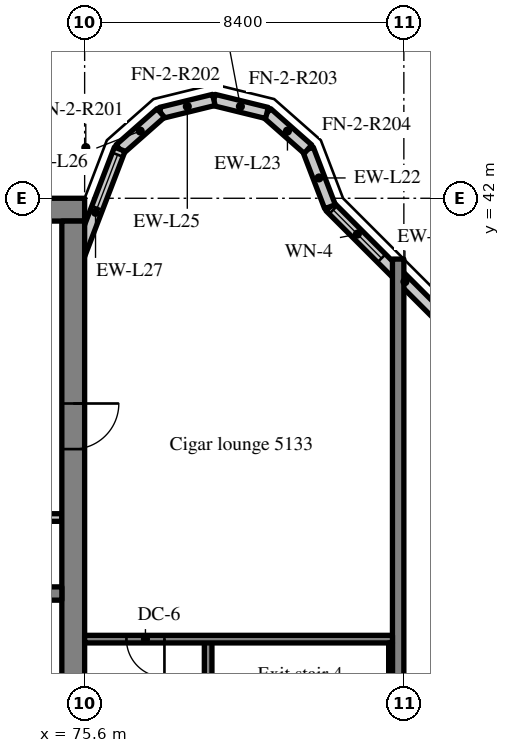
"""IFC4 building model, lengths in metres.
Left out: names, types, materials, properties, quantities, classifications, styles, units other than length and angle.
Written with IfcOpenShell. Run it as: python <this file> out.ifc"""

import sys

from ifc_helpers import new_model, si_unit, direction, frame, frame_2d, origin, place, context, subcontext, project, spatial, rectangle, extrude, source, transform, mapped, element, fill, save


model = new_model("IFC4")
c1 = context("Model", 3, precision=1e-05, world=origin(), true_north=direction((0.0, 1.0)))
c2 = subcontext(c1, "Body", "Model", "MODEL_VIEW")
j1 = project(units=[si_unit("LENGTHUNIT", "METRE"), si_unit("PLANEANGLEUNIT", "RADIAN")], contexts=[c1])
p1 = place(None, origin())
s1 = spatial("IfcSite", under=j1, at=p1, CompositionType="ELEMENT")
p2 = place(p1, origin())
s2 = spatial("IfcBuilding", under=s1, at=p2, CompositionType="ELEMENT")
p3 = place(p2, frame((0.0, 0.0, 214.0)))
s3 = spatial("IfcBuildingStorey", under=s2, at=p3, CompositionType="ELEMENT", Elevation=214.0)
m1 = source(origin(), c2, "Body", "SweptSolid", [
    extrude(rectangle(XDim=50.4, YDim=0.6, at=frame_2d((25.2, 0.0))), origin(), (0.0, 0.0, 1.0), 3.62),
])
p4 = place(p3, frame((25.2, 41.7, 0.0), z_axis=(0.0, 0.0, 1.0), x_axis=(1.0, 0.0, 0.0)))
e1 = element("IfcWall", 1, at=p4, inside=s3, PredefinedType="SHEAR", context=c2, shape_type="MappedRepresentation", body=[
    mapped(m1, transform((0.0, 0.0, 0.0), scale=1.0)),
])
m2 = source(origin(), c2, "Body", "SweptSolid", [
    extrude(rectangle(XDim=18.8, YDim=0.6, at=frame_2d((9.4, 0.0))), origin(), (0.0, 0.0, 1.0), 3.62),
])
p5 = place(p3, frame((75.3, 22.6, 0.0), z_axis=(0.0, 0.0, 1.0), x_axis=(0.0, 1.0, 0.0)))
e2 = element("IfcWall", 2, at=p5, inside=s3, PredefinedType="SHEAR", context=c2, shape_type="MappedRepresentation", body=[
    mapped(m2, transform((0.0, 0.0, 0.0), scale=1.0)),
])
m3 = source(origin(), c2, "Body", "SweptSolid", [
    extrude(rectangle(XDim=1.2, YDim=2.1, at=frame_2d((0.6, 1.05))), frame((0.0, 0.31, 0.0), z_axis=(0.0, -1.0, 0.0), x_axis=(1.0, 0.0, 0.0)), (0.0, 0.0, 1.0), 0.62),
])
p6 = place(p5, frame((12.8, 0.0, 0.0)))
e3 = element("IfcOpeningElement", 3, at=p6, cuts=e2, PredefinedType="OPENING", context=c2, shape_type="MappedRepresentation", body=[
    mapped(m3, transform((0.0, 0.0, 0.0), scale=1.0)),
])
m4 = source(origin(), c2, "Body", "SweptSolid", [
    extrude(rectangle(XDim=7.625, YDim=0.35, at=frame_2d((3.812, 0.0))), origin(), (0.0, 0.0, 1.0), 3.62),
])
p7 = place(p3, frame((67.375, 31.6, 0.0), z_axis=(0.0, 0.0, 1.0), x_axis=(1.0, 0.0, 0.0)))
e4 = element("IfcWall", 4, at=p7, inside=s3, PredefinedType="SHEAR", context=c2, shape_type="MappedRepresentation", body=[
    mapped(m4, transform((0.0, 0.0, 0.0), scale=1.0)),
])
m5 = source(origin(), c2, "Body", "SweptSolid", [
    extrude(rectangle(XDim=1.1, YDim=2.1, at=frame_2d((0.55, 1.05))), frame((0.0, 0.185, 0.0), z_axis=(0.0, -1.0, 0.0), x_axis=(1.0, 0.0, 0.0)), (0.0, 0.0, 1.0), 0.37),
])
p8 = place(p7, frame((5.8, 0.0, 0.0)))
e5 = element("IfcOpeningElement", 5, at=p8, cuts=e4, PredefinedType="OPENING", context=c2, shape_type="MappedRepresentation", body=[
    mapped(m5, transform((0.0, 0.0, 0.0), scale=1.0)),
])
m6 = source(origin(), c2, "Body", "SweptSolid", [
    extrude(rectangle(XDim=18.4, YDim=0.3, at=frame_2d((9.2, 0.0))), origin(), (0.0, 0.0, 1.0), 3.62),
])
p9 = place(p3, frame((83.85, 22.0, 0.0), z_axis=(0.0, 0.0, 1.0), x_axis=(0.0, 1.0, 0.0)))
e6 = element("IfcWall", 6, at=p9, inside=s3, PredefinedType="SHEAR", context=c2, shape_type="MappedRepresentation", body=[
    mapped(m6, transform((0.0, 0.0, 0.0), scale=1.0)),
])
m7 = source(origin(), c2, "Body", "SweptSolid", [
    extrude(rectangle(XDim=5.576, YDim=0.3, at=frame_2d((2.788, 0.0))), origin(), (0.0, 0.0, 1.0), 3.62),
])
p10 = place(p3, frame((86.0, 37.834, 0.0), z_axis=(0.0, 0.0, 1.0), x_axis=(-0.707106781187, 0.707106781187, 0.0)))
e7 = element("IfcWall", 7, at=p10, inside=s3, PredefinedType="SOLIDWALL", context=c2, shape_type="MappedRepresentation", body=[
    mapped(m7, transform((0.0, 0.0, 0.0), scale=1.0)),
])
m8 = source(origin(), c2, "Body", "SweptSolid", [
    extrude(rectangle(XDim=1.8, YDim=1.5, at=frame_2d((0.9, 0.75))), frame((0.0, 0.16, 0.0), z_axis=(0.0, -1.0, 0.0), x_axis=(1.0, 0.0, 0.0)), (0.0, 0.0, 1.0), 0.32),
])
p11 = place(p10, frame((3.658, 0.0, 0.9)))
e8 = element("IfcOpeningElement", 8, at=p11, cuts=e7, PredefinedType="OPENING", context=c2, shape_type="MappedRepresentation", body=[
    mapped(m8, transform((0.0, 0.0, 0.0), scale=1.0)),
])
m9 = source(origin(), c2, "Body", "SweptSolid", [
    extrude(rectangle(XDim=1.622, YDim=0.3, at=frame_2d((0.811, 0.0))), origin(), (0.0, 0.0, 1.0), 3.62),
])
p12 = place(p3, frame((82.057, 41.777, 0.0), z_axis=(0.0, 0.0, 1.0), x_axis=(-0.357778527068, 0.933806471154, 0.0)))
e9 = element("IfcWall", 9, at=p12, inside=s3, PredefinedType="SOLIDWALL", context=c2, shape_type="MappedRepresentation", body=[
    mapped(m9, transform((0.0, 0.0, 0.0), scale=1.0)),
])
m10 = source(origin(), c2, "Body", "SweptSolid", [
    extrude(rectangle(XDim=1.44, YDim=0.3, at=frame_2d((0.72, 0.0))), origin(), (0.0, 0.0, 1.0), 3.62),
])
p13 = place(p3, frame((81.477, 43.292, 0.0), z_axis=(0.0, 0.0, 1.0), x_axis=(-0.74957555648, 0.661918790432, 0.0)))
e10 = element("IfcWall", 10, at=p13, inside=s3, PredefinedType="SOLIDWALL", context=c2, shape_type="MappedRepresentation", body=[
    mapped(m10, transform((0.0, 0.0, 0.0), scale=1.0)),
])
m11 = source(origin(), c2, "Body", "SweptSolid", [
    extrude(rectangle(XDim=1.439, YDim=0.3, at=frame_2d((0.719, 0.0))), origin(), (0.0, 0.0, 1.0), 3.62),
])
for number, where, z_axis, x_axis in (
    (11, (80.397, 44.245, 0.0), (0.0, 0.0, 1.0), (-0.971, 0.238, 0.0)),
    (12, (79.0, 44.588, 0.0), (0.0, 0.0, 1.0), (-0.971, -0.238, 0.0)),
):
    element("IfcWall", number, at=place(p3, frame(where, z_axis=z_axis, x_axis=x_axis)), inside=s3, PredefinedType="SOLIDWALL", context=c2, shape_type="MappedRepresentation", body=[
        mapped(m11, transform((0.0, 0.0, 0.0), scale=1.0)),
    ])
p14 = place(p3, frame((77.603, 44.245, 0.0), z_axis=(0.0, 0.0, 1.0), x_axis=(-0.74957555648, -0.661918790432, 0.0)))
e13 = element("IfcWall", 13, at=p14, inside=s3, PredefinedType="SOLIDWALL", context=c2, shape_type="MappedRepresentation", body=[
    mapped(m10, transform((0.0, 0.0, 0.0), scale=1.0)),
])
m12 = source(origin(), c2, "Body", "SweptSolid", [
    extrude(rectangle(XDim=3.559, YDim=0.3, at=frame_2d((1.78, 0.0))), origin(), (0.0, 0.0, 1.0), 3.62),
])
p15 = place(p3, frame((76.523, 43.292, 0.0), z_axis=(0.0, 0.0, 1.0), x_axis=(-0.35779745313, -0.933799219604, 0.0)))
e14 = element("IfcWall", 14, at=p15, inside=s3, PredefinedType="SOLIDWALL", context=c2, shape_type="MappedRepresentation", body=[
    mapped(m12, transform((0.0, 0.0, 0.0), scale=1.0)),
])
m13 = source(origin(), c2, "Body", "SweptSolid", [
    extrude(rectangle(XDim=1.5, YDim=2.0, at=frame_2d((0.75, 1.0))), frame((0.0, 0.16, 0.0), z_axis=(0.0, -1.0, 0.0), x_axis=(1.0, 0.0, 0.0)), (0.0, 0.0, 1.0), 0.32),
])
p16 = place(p15, frame((0.156, 0.0, 0.9)))
e15 = element("IfcOpeningElement", 15, at=p16, cuts=e14, PredefinedType="OPENING", context=c2, shape_type="MappedRepresentation", body=[
    mapped(m13, transform((0.0, 0.0, 0.0), scale=1.0)),
])
m14 = source(origin(), c2, "Body", "SweptSolid", [
    extrude(rectangle(XDim=2.55, YDim=0.2, at=frame_2d((1.275, 0.0))), origin(), (0.0, 0.0, 1.0), 3.62),
])
p17 = place(p3, frame((72.45, 33.6, 0.0), z_axis=(0.0, 0.0, 1.0), x_axis=(1.0, 0.0, 0.0)))
e16 = element("IfcWall", 16, at=p17, inside=s3, PredefinedType="SOLIDWALL", context=c2, shape_type="MappedRepresentation", body=[
    mapped(m14, transform((0.0, 0.0, 0.0), scale=1.0)),
])
m15 = source(origin(), c2, "Body", "SweptSolid", [
    extrude(rectangle(XDim=8.3, YDim=0.2, at=frame_2d((4.15, 0.0))), origin(), (0.0, 0.0, 1.0), 3.62),
])
p18 = place(p3, frame((78.85, 22.1, 0.0), z_axis=(0.0, 0.0, 1.0), x_axis=(0.0, 1.0, 0.0)))
e17 = element("IfcWall", 17, at=p18, inside=s3, PredefinedType="SOLIDWALL", context=c2, shape_type="MappedRepresentation", body=[
    mapped(m15, transform((0.0, 0.0, 0.0), scale=1.0)),
])
m16 = source(origin(), c2, "Body", "SweptSolid", [
    extrude(rectangle(XDim=1.2, YDim=2.1, at=frame_2d((0.6, 1.05))), frame((0.0, 0.11, 0.0), z_axis=(0.0, -1.0, 0.0), x_axis=(1.0, 0.0, 0.0)), (0.0, 0.0, 1.0), 0.22),
])
p19 = place(p18, frame((0.6, 0.0, 0.0)))
e18 = element("IfcOpeningElement", 18, at=p19, cuts=e17, PredefinedType="OPENING", context=c2, shape_type="MappedRepresentation", body=[
    mapped(m16, transform((0.0, 0.0, 0.0), scale=1.0)),
])
m17 = source(origin(), c2, "Body", "SweptSolid", [
    extrude(rectangle(XDim=8.1, YDim=0.2, at=frame_2d((4.05, 0.0))), origin(), (0.0, 0.0, 1.0), 3.62),
])
p20 = place(p3, frame((83.7, 30.4, 0.0), z_axis=(0.0, 0.0, 1.0), x_axis=(-1.0, 0.0, 0.0)))
e19 = element("IfcWall", 19, at=p20, inside=s3, PredefinedType="SOLIDWALL", context=c2, shape_type="MappedRepresentation", body=[
    mapped(m17, transform((0.0, 0.0, 0.0), scale=1.0)),
])
m18 = source(origin(), c2, "Body", "SweptSolid", [
    extrude(rectangle(XDim=1.0, YDim=2.1, at=frame_2d((0.5, 1.05))), frame((0.0, 0.11, 0.0), z_axis=(0.0, -1.0, 0.0), x_axis=(1.0, 0.0, 0.0)), (0.0, 0.0, 1.0), 0.22),
])
p21 = place(p20, frame((6.0, 0.0, 0.0)))
e20 = element("IfcOpeningElement", 20, at=p21, cuts=e19, PredefinedType="OPENING", context=c2, shape_type="MappedRepresentation", body=[
    mapped(m18, transform((0.0, 0.0, 0.0), scale=1.0)),
])
m19 = source(origin(), c2, "Body", "SweptSolid", [
    extrude(rectangle(XDim=8.1, YDim=0.1, at=frame_2d((4.05, 0.0))), origin(), (0.0, 0.0, 1.0), 3.62),
])
p22 = place(p3, frame((83.65, 22.2, 0.0), z_axis=(0.0, 0.0, 1.0), x_axis=(0.0, 1.0, 0.0)))
e21 = element("IfcWall", 21, at=p22, inside=s3, PredefinedType="SOLIDWALL", context=c2, shape_type="MappedRepresentation", body=[
    mapped(m19, transform((0.0, 0.0, 0.0), scale=1.0)),
])
m20 = source(origin(), c2, "Body", "SweptSolid", [
    extrude(rectangle(XDim=1.8, YDim=1.5, at=frame_2d((0.9, 0.75))), frame((0.0, 0.03, 0.0), z_axis=(0.0, -1.0, 0.0), x_axis=(1.0, 0.0, 0.0)), (0.0, 0.0, 1.0), 0.06),
])
p23 = place(p11, origin())
e22 = element("IfcWindow", 22, at=p23, inside=s3, PartitioningType="SINGLE_PANEL", PredefinedType="WINDOW", context=c2, shape_type="MappedRepresentation", body=[
    mapped(m20, transform((0.0, 0.0, 0.0), scale=1.0)),
])
fill(e8, e22)
m21 = source(origin(), c2, "Body", "SweptSolid", [
    extrude(rectangle(XDim=1.5, YDim=2.0, at=frame_2d((0.75, 1.0))), frame((0.0, 0.03, 0.0), z_axis=(0.0, -1.0, 0.0), x_axis=(1.0, 0.0, 0.0)), (0.0, 0.0, 1.0), 0.06),
])
p24 = place(p16, origin())
e23 = element("IfcWindow", 23, at=p24, inside=s3, PartitioningType="SINGLE_PANEL", PredefinedType="WINDOW", context=c2, shape_type="MappedRepresentation", body=[
    mapped(m21, transform((0.0, 0.0, 0.0), scale=1.0)),
])
fill(e15, e23)
m22 = source(origin(), c2, "Body", "SweptSolid", [
    extrude(rectangle(XDim=1.2, YDim=2.1, at=frame_2d((0.6, 1.05))), frame((0.0, 0.025, 0.0), z_axis=(0.0, -1.0, 0.0), x_axis=(1.0, 0.0, 0.0)), (0.0, 0.0, 1.0), 0.05),
])
p25 = place(p6, origin())
e24 = element("IfcDoor", 24, at=p25, inside=s3, OperationType="SINGLE_SWING_RIGHT", PredefinedType="DOOR", context=c2, shape_type="MappedRepresentation", body=[
    mapped(m22, transform((0.0, 0.0, 0.0), scale=1.0)),
])
fill(e3, e24)
m23 = source(origin(), c2, "Body", "SweptSolid", [
    extrude(rectangle(XDim=1.0, YDim=2.1, at=frame_2d((0.5, 1.05))), frame((0.0, 0.025, 0.0), z_axis=(0.0, -1.0, 0.0), x_axis=(1.0, 0.0, 0.0)), (0.0, 0.0, 1.0), 0.05),
])
p26 = place(p21, origin())
e25 = element("IfcDoor", 25, at=p26, inside=s3, OperationType="SINGLE_SWING_LEFT", PredefinedType="DOOR", context=c2, shape_type="MappedRepresentation", body=[
    mapped(m23, transform((0.0, 0.0, 0.0), scale=1.0)),
])
fill(e20, e25)
save(model, sys.argv[1])
